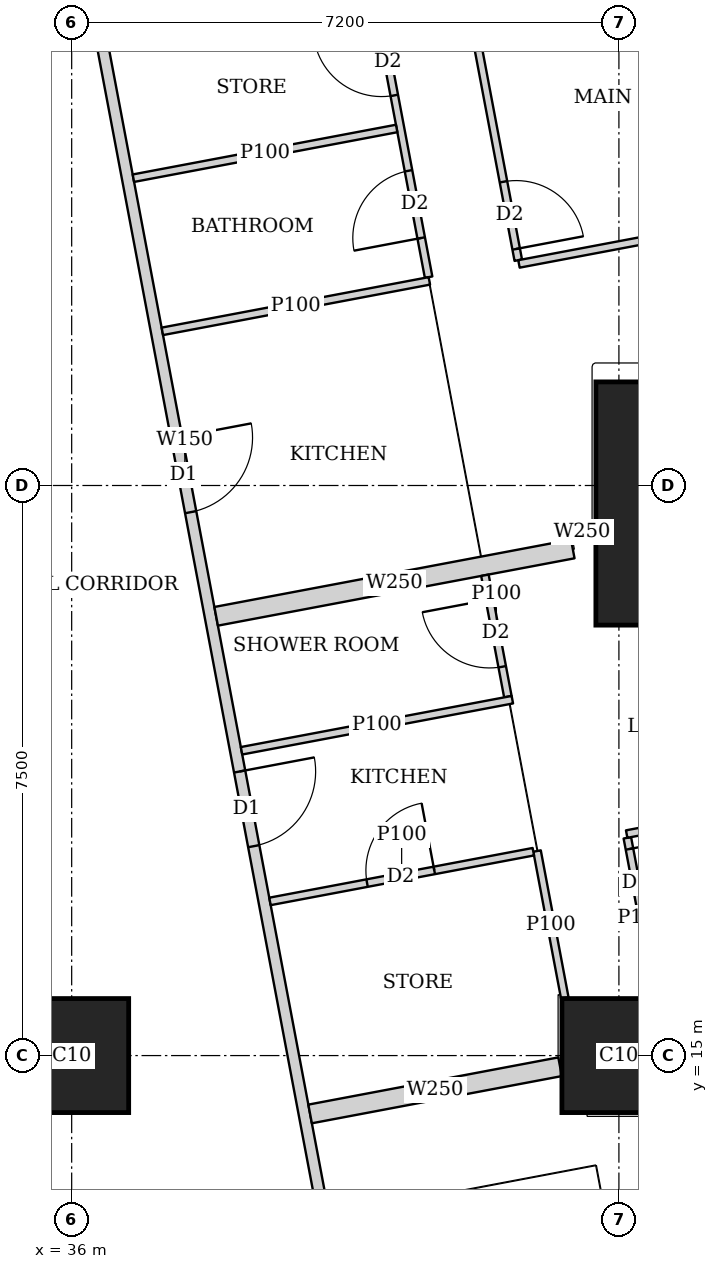
"""IFC4 building model, lengths in metres.
Left out: names, types, materials, properties, quantities, classifications, styles, units other than length and angle.
Written with IfcOpenShell. Run it as: python <this file> out.ifc"""

import sys

from ifc_helpers import new_model, si_unit, direction, frame, frame_2d, origin, origin_2d, place, context, subcontext, project, spatial, rectangle, extrude, element, fill, save


model = new_model("IFC4")
c1 = context("Model", 3, precision=1e-05, world=origin(), true_north=direction((0.0, 1.0)))
c2 = subcontext(c1, "Body", "Model", "MODEL_VIEW")
j1 = project(units=[si_unit("LENGTHUNIT", "METRE"), si_unit("PLANEANGLEUNIT", "RADIAN")], contexts=[c1])
p1 = place(None, origin())
s1 = spatial("IfcSite", under=j1, at=p1, CompositionType="ELEMENT")
p2 = place(p1, origin())
s2 = spatial("IfcBuilding", under=s1, at=p2, CompositionType="ELEMENT")
p3 = place(p2, frame((0.0, 0.0, 135.8)))
s3 = spatial("IfcBuildingStorey", under=s2, at=p3, CompositionType="ELEMENT", Elevation=135.8)
for number, where, z_axis, x_axis in (
    (1, (36.0, 15.0, 0.0), (0.0, 0.0, 1.0), (1.0, 0.0, 0.0)),
    (2, (43.2, 15.0, 0.0), (0.0, 0.0, 1.0), (1.0, 0.0, 0.0)),
):
    element("IfcColumn", number, at=place(p3, frame(where, z_axis=z_axis, x_axis=x_axis)), inside=s3, PredefinedType="COLUMN", context=c2, shape_type="SweptSolid", body=[
        extrude(rectangle(XDim=1.5, YDim=1.5, at=origin_2d()), origin(), (0.0, 0.0, 1.0), 3.75),
    ])
p4 = place(p3, frame((44.697, 22.263, 0.0), z_axis=(0.0, 0.0, 1.0), x_axis=(1.0, 0.0, 0.0)))
e3 = element("IfcColumn", 3, at=p4, inside=s3, PredefinedType="COLUMN", context=c2, shape_type="SweptSolid", body=[
    extrude(rectangle(XDim=3.6, YDim=3.2, at=origin_2d()), origin(), (0.0, 0.0, 1.0), 3.75),
])
p5 = place(p3, frame((50.653, 2.703, 0.0), z_axis=(0.0, 0.0, 1.0), x_axis=(-0.185612026696, 0.982623109613, 0.0)))
e4 = element("IfcWall", 4, at=p5, inside=s3, PredefinedType="SOLIDWALL", context=c2, shape_type="SweptSolid", body=[
    extrude(rectangle(XDim=41.393, YDim=0.2, at=frame_2d((20.697, 0.0))), origin(), (0.0, 0.0, 1.0), 3.5),
])
p6 = place(p5, frame((1.633, 0.0, 0.9)))
e5 = element("IfcOpeningElement", 5, at=p6, cuts=e4, PredefinedType="OPENING", context=c2, shape_type="SweptSolid", body=[
    extrude(rectangle(XDim=1.8, YDim=1.5, at=frame_2d((0.9, 0.75))), frame((0.0, 0.11, 0.0), z_axis=(0.0, -1.0, 0.0), x_axis=(1.0, 0.0, 0.0)), (0.0, 0.0, 1.0), 0.22),
])
p7 = place(p5, frame((6.032, 0.0, 0.9)))
e6 = element("IfcOpeningElement", 6, at=p7, cuts=e4, PredefinedType="OPENING", context=c2, shape_type="SweptSolid", body=[
    extrude(rectangle(XDim=1.8, YDim=1.5, at=frame_2d((0.9, 0.75))), frame((0.0, 0.11, 0.0), z_axis=(0.0, -1.0, 0.0), x_axis=(1.0, 0.0, 0.0)), (0.0, 0.0, 1.0), 0.22),
])
p8 = place(p5, frame((9.848, 0.0, 0.9)))
e7 = element("IfcOpeningElement", 7, at=p8, cuts=e4, PredefinedType="OPENING", context=c2, shape_type="SweptSolid", body=[
    extrude(rectangle(XDim=1.8, YDim=1.5, at=frame_2d((0.9, 0.75))), frame((0.0, 0.11, 0.0), z_axis=(0.0, -1.0, 0.0), x_axis=(1.0, 0.0, 0.0)), (0.0, 0.0, 1.0), 0.22),
])
p9 = place(p5, frame((13.664, 0.0, 0.9)))
e8 = element("IfcOpeningElement", 8, at=p9, cuts=e4, PredefinedType="OPENING", context=c2, shape_type="SweptSolid", body=[
    extrude(rectangle(XDim=1.8, YDim=1.5, at=frame_2d((0.9, 0.75))), frame((0.0, 0.11, 0.0), z_axis=(0.0, -1.0, 0.0), x_axis=(1.0, 0.0, 0.0)), (0.0, 0.0, 1.0), 0.22),
])
p10 = place(p5, frame((17.481, 0.0, 0.9)))
e9 = element("IfcOpeningElement", 9, at=p10, cuts=e4, PredefinedType="OPENING", context=c2, shape_type="SweptSolid", body=[
    extrude(rectangle(XDim=1.8, YDim=1.5, at=frame_2d((0.9, 0.75))), frame((0.0, 0.11, 0.0), z_axis=(0.0, -1.0, 0.0), x_axis=(1.0, 0.0, 0.0)), (0.0, 0.0, 1.0), 0.22),
])
p11 = place(p5, frame((21.297, 0.0, 0.9)))
e10 = element("IfcOpeningElement", 10, at=p11, cuts=e4, PredefinedType="OPENING", context=c2, shape_type="SweptSolid", body=[
    extrude(rectangle(XDim=1.8, YDim=1.5, at=frame_2d((0.9, 0.75))), frame((0.0, 0.11, 0.0), z_axis=(0.0, -1.0, 0.0), x_axis=(1.0, 0.0, 0.0)), (0.0, 0.0, 1.0), 0.22),
])
p12 = place(p5, frame((25.113, 0.0, 0.9)))
e11 = element("IfcOpeningElement", 11, at=p12, cuts=e4, PredefinedType="OPENING", context=c2, shape_type="SweptSolid", body=[
    extrude(rectangle(XDim=1.8, YDim=1.5, at=frame_2d((0.9, 0.75))), frame((0.0, 0.11, 0.0), z_axis=(0.0, -1.0, 0.0), x_axis=(1.0, 0.0, 0.0)), (0.0, 0.0, 1.0), 0.22),
])
p13 = place(p5, frame((28.93, 0.0, 0.9)))
e12 = element("IfcOpeningElement", 12, at=p13, cuts=e4, PredefinedType="OPENING", context=c2, shape_type="SweptSolid", body=[
    extrude(rectangle(XDim=1.8, YDim=1.5, at=frame_2d((0.9, 0.75))), frame((0.0, 0.11, 0.0), z_axis=(0.0, -1.0, 0.0), x_axis=(1.0, 0.0, 0.0)), (0.0, 0.0, 1.0), 0.22),
])
p14 = place(p5, frame((32.746, 0.0, 0.9)))
e13 = element("IfcOpeningElement", 13, at=p14, cuts=e4, PredefinedType="OPENING", context=c2, shape_type="SweptSolid", body=[
    extrude(rectangle(XDim=1.8, YDim=1.5, at=frame_2d((0.9, 0.75))), frame((0.0, 0.11, 0.0), z_axis=(0.0, -1.0, 0.0), x_axis=(1.0, 0.0, 0.0)), (0.0, 0.0, 1.0), 0.22),
])
p15 = place(p5, frame((36.481, 0.0, 0.9)))
e14 = element("IfcOpeningElement", 14, at=p15, cuts=e4, PredefinedType="OPENING", context=c2, shape_type="SweptSolid", body=[
    extrude(rectangle(XDim=1.8, YDim=1.5, at=frame_2d((0.9, 0.75))), frame((0.0, 0.11, 0.0), z_axis=(0.0, -1.0, 0.0), x_axis=(1.0, 0.0, 0.0)), (0.0, 0.0, 1.0), 0.22),
])
p16 = place(p3, frame((33.623, 43.022, 0.0), z_axis=(0.0, 0.0, 1.0), x_axis=(0.185596841028, -0.98262597798, 0.0)))
e15 = element("IfcWall", 15, at=p16, inside=s3, PredefinedType="SOLIDWALL", context=c2, shape_type="SweptSolid", body=[
    extrude(rectangle(XDim=41.66, YDim=0.15, at=frame_2d((20.83, 0.0))), origin(), (0.0, 0.0, 1.0), 2.5),
])
p17 = place(p16, frame((20.242, 0.0, 0.0)))
e16 = element("IfcOpeningElement", 16, at=p17, cuts=e15, PredefinedType="OPENING", context=c2, shape_type="SweptSolid", body=[
    extrude(rectangle(XDim=1.0, YDim=2.1, at=frame_2d((0.5, 1.05))), frame((0.0, 0.085, 0.0), z_axis=(0.0, -1.0, 0.0), x_axis=(1.0, 0.0, 0.0)), (0.0, 0.0, 1.0), 0.17),
])
p18 = place(p16, frame((24.714, 0.0, 0.0)))
e17 = element("IfcOpeningElement", 17, at=p18, cuts=e15, PredefinedType="OPENING", context=c2, shape_type="SweptSolid", body=[
    extrude(rectangle(XDim=1.0, YDim=2.1, at=frame_2d((0.5, 1.05))), frame((0.0, 0.085, 0.0), z_axis=(0.0, -1.0, 0.0), x_axis=(1.0, 0.0, 0.0)), (0.0, 0.0, 1.0), 0.17),
])
p19 = place(p16, frame((31.206, 0.0, 0.0)))
e18 = element("IfcOpeningElement", 18, at=p19, cuts=e15, PredefinedType="OPENING", context=c2, shape_type="SweptSolid", body=[
    extrude(rectangle(XDim=1.0, YDim=2.1, at=frame_2d((0.5, 1.05))), frame((0.0, 0.085, 0.0), z_axis=(0.0, -1.0, 0.0), x_axis=(1.0, 0.0, 0.0)), (0.0, 0.0, 1.0), 0.17),
])
p20 = place(p3, frame((38.701, 42.27, 0.0), z_axis=(0.0, 0.0, 1.0), x_axis=(0.185640619081, -0.98261770824, 0.0)))
e19 = element("IfcWall", 19, at=p20, inside=s3, PredefinedType="PARTITIONING", context=c2, shape_type="SweptSolid", body=[
    extrude(rectangle(XDim=17.103, YDim=0.1, at=frame_2d((8.552, 0.0))), origin(), (0.0, 0.0, 1.0), 2.5),
])
p21 = place(p20, frame((16.053, 0.0, 0.0)))
e20 = element("IfcOpeningElement", 20, at=p21, cuts=e19, PredefinedType="OPENING", context=c2, shape_type="SweptSolid", body=[
    extrude(rectangle(XDim=0.9, YDim=2.1, at=frame_2d((0.45, 1.05))), frame((0.0, 0.06, 0.0), z_axis=(0.0, -1.0, 0.0), x_axis=(1.0, 0.0, 0.0)), (0.0, 0.0, 1.0), 0.12),
])
p22 = place(p20, frame((12.077, 0.0, 0.0)))
e21 = element("IfcOpeningElement", 21, at=p22, cuts=e19, PredefinedType="OPENING", context=c2, shape_type="SweptSolid", body=[
    extrude(rectangle(XDim=0.9, YDim=2.1, at=frame_2d((0.45, 1.05))), frame((0.0, 0.06, 0.0), z_axis=(0.0, -1.0, 0.0), x_axis=(1.0, 0.0, 0.0)), (0.0, 0.0, 1.0), 0.12),
])
p23 = place(p20, frame((8.42, 0.0, 0.0)))
e22 = element("IfcOpeningElement", 22, at=p23, cuts=e19, PredefinedType="OPENING", context=c2, shape_type="SweptSolid", body=[
    extrude(rectangle(XDim=0.9, YDim=2.1, at=frame_2d((0.45, 1.05))), frame((0.0, 0.06, 0.0), z_axis=(0.0, -1.0, 0.0), x_axis=(1.0, 0.0, 0.0)), (0.0, 0.0, 1.0), 0.12),
])
p24 = place(p20, frame((4.444, 0.0, 0.0)))
e23 = element("IfcOpeningElement", 23, at=p24, cuts=e19, PredefinedType="OPENING", context=c2, shape_type="SweptSolid", body=[
    extrude(rectangle(XDim=0.9, YDim=2.1, at=frame_2d((0.45, 1.05))), frame((0.0, 0.06, 0.0), z_axis=(0.0, -1.0, 0.0), x_axis=(1.0, 0.0, 0.0)), (0.0, 0.0, 1.0), 0.12),
])
p25 = place(p3, frame((37.411, 42.638, 0.0), z_axis=(0.0, 0.0, 1.0), x_axis=(0.185555586706, -0.982633769134, 0.0)))
e24 = element("IfcWall", 24, at=p25, inside=s3, PredefinedType="PARTITIONING", context=c2, shape_type="SweptSolid", body=[
    extrude(rectangle(XDim=17.704, YDim=0.1, at=frame_2d((8.852, 0.0))), origin(), (0.0, 0.0, 1.0), 2.5),
])
p26 = place(p25, frame((16.28, 0.0, 0.0)))
e25 = element("IfcOpeningElement", 25, at=p26, cuts=e24, PredefinedType="OPENING", context=c2, shape_type="SweptSolid", body=[
    extrude(rectangle(XDim=0.9, YDim=2.1, at=frame_2d((0.45, 1.05))), frame((0.0, 0.06, 0.0), z_axis=(0.0, -1.0, 0.0), x_axis=(1.0, 0.0, 0.0)), (0.0, 0.0, 1.0), 0.12),
])
p27 = place(p25, frame((12.688, 0.0, 0.0)))
e26 = element("IfcOpeningElement", 26, at=p27, cuts=e24, PredefinedType="OPENING", context=c2, shape_type="SweptSolid", body=[
    extrude(rectangle(XDim=0.9, YDim=2.1, at=frame_2d((0.45, 1.05))), frame((0.0, 0.06, 0.0), z_axis=(0.0, -1.0, 0.0), x_axis=(1.0, 0.0, 0.0)), (0.0, 0.0, 1.0), 0.12),
])
p28 = place(p25, frame((8.822, 0.0, 0.0)))
e27 = element("IfcOpeningElement", 27, at=p28, cuts=e24, PredefinedType="OPENING", context=c2, shape_type="SweptSolid", body=[
    extrude(rectangle(XDim=0.9, YDim=2.1, at=frame_2d((0.45, 1.05))), frame((0.0, 0.06, 0.0), z_axis=(0.0, -1.0, 0.0), x_axis=(1.0, 0.0, 0.0)), (0.0, 0.0, 1.0), 0.12),
])
p29 = place(p25, frame((3.188, 0.0, 0.0)))
e28 = element("IfcOpeningElement", 28, at=p29, cuts=e24, PredefinedType="OPENING", context=c2, shape_type="SweptSolid", body=[
    extrude(rectangle(XDim=0.9, YDim=2.1, at=frame_2d((0.45, 1.05))), frame((0.0, 0.06, 0.0), z_axis=(0.0, -1.0, 0.0), x_axis=(1.0, 0.0, 0.0)), (0.0, 0.0, 1.0), 0.12),
])
p30 = place(p25, frame((0.15, 0.0, 0.0)))
e29 = element("IfcOpeningElement", 29, at=p30, cuts=e24, PredefinedType="OPENING", context=c2, shape_type="SweptSolid", body=[
    extrude(rectangle(XDim=0.9, YDim=2.1, at=frame_2d((0.45, 1.05))), frame((0.0, 0.06, 0.0), z_axis=(0.0, -1.0, 0.0), x_axis=(1.0, 0.0, 0.0)), (0.0, 0.0, 1.0), 0.12),
])
p31 = place(p25, frame((14.371, 0.0, 0.0)))
e30 = element("IfcOpeningElement", 30, at=p31, cuts=e24, PredefinedType="OPENING", context=c2, shape_type="SweptSolid", body=[
    extrude(rectangle(XDim=0.9, YDim=2.1, at=frame_2d((0.45, 1.05))), frame((0.0, 0.06, 0.0), z_axis=(0.0, -1.0, 0.0), x_axis=(1.0, 0.0, 0.0)), (0.0, 0.0, 1.0), 0.12),
])
p32 = place(p25, frame((10.78, 0.0, 0.0)))
e31 = element("IfcOpeningElement", 31, at=p32, cuts=e24, PredefinedType="OPENING", context=c2, shape_type="SweptSolid", body=[
    extrude(rectangle(XDim=0.9, YDim=2.1, at=frame_2d((0.45, 1.05))), frame((0.0, 0.06, 0.0), z_axis=(0.0, -1.0, 0.0), x_axis=(1.0, 0.0, 0.0)), (0.0, 0.0, 1.0), 0.12),
])
p33 = place(p25, frame((6.154, 0.0, 0.0)))
e32 = element("IfcOpeningElement", 32, at=p33, cuts=e24, PredefinedType="OPENING", context=c2, shape_type="SweptSolid", body=[
    extrude(rectangle(XDim=0.9, YDim=2.1, at=frame_2d((0.45, 1.05))), frame((0.0, 0.06, 0.0), z_axis=(0.0, -1.0, 0.0), x_axis=(1.0, 0.0, 0.0)), (0.0, 0.0, 1.0), 0.12),
])
p34 = place(p3, frame((46.11, 26.213, 0.0), z_axis=(0.0, 0.0, 1.0), x_axis=(-0.982633535512, -0.185556823879, 0.0)))
e33 = element("IfcWall", 33, at=p34, inside=s3, PredefinedType="PARTITIONING", context=c2, shape_type="SweptSolid", body=[
    extrude(rectangle(XDim=4.3, YDim=0.1, at=frame_2d((2.15, 0.0))), origin(), (0.0, 0.0, 1.0), 2.1),
])
p35 = place(p3, frame((40.706, 25.192, 0.0), z_axis=(0.0, 0.0, 1.0), x_axis=(-0.982610675728, -0.185677839134, 0.0)))
e34 = element("IfcWall", 34, at=p35, inside=s3, PredefinedType="PARTITIONING", context=c2, shape_type="SweptSolid", body=[
    extrude(rectangle(XDim=3.575, YDim=0.1, at=frame_2d((1.788, 0.0))), origin(), (0.0, 0.0, 1.0), 3.5),
])
p36 = place(p3, frame((40.276, 27.197, 0.0), z_axis=(0.0, 0.0, 1.0), x_axis=(-0.982636169624, -0.185542874149, 0.0)))
e35 = element("IfcWall", 35, at=p36, inside=s3, PredefinedType="PARTITIONING", context=c2, shape_type="SweptSolid", body=[
    extrude(rectangle(XDim=3.525, YDim=0.1, at=frame_2d((1.763, 0.0))), origin(), (0.0, 0.0, 1.0), 3.5),
])
p37 = place(p3, frame((41.437, 21.319, 0.0), z_axis=(0.0, 0.0, 1.0), x_axis=(0.185793689589, -0.982588777113, 0.0)))
e36 = element("IfcWall", 36, at=p37, inside=s3, PredefinedType="PARTITIONING", context=c2, shape_type="SweptSolid", body=[
    extrude(rectangle(XDim=1.625, YDim=0.1, at=frame_2d((0.813, 0.0))), origin(), (0.0, 0.0, 1.0), 3.5),
])
p38 = place(p37, frame((0.325, 0.0, 0.0)))
e37 = element("IfcOpeningElement", 37, at=p38, cuts=e36, PredefinedType="OPENING", context=c2, shape_type="SweptSolid", body=[
    extrude(rectangle(XDim=0.9, YDim=2.1, at=frame_2d((0.45, 1.05))), frame((0.0, 0.06, 0.0), z_axis=(0.0, -1.0, 0.0), x_axis=(1.0, 0.0, 0.0)), (0.0, 0.0, 1.0), 0.12),
])
p39 = place(p3, frame((41.798, 19.682, 0.0), z_axis=(0.0, 0.0, 1.0), x_axis=(-0.982681091817, -0.185304807776, 0.0)))
e38 = element("IfcWall", 38, at=p39, inside=s3, PredefinedType="PARTITIONING", context=c2, shape_type="SweptSolid", body=[
    extrude(rectangle(XDim=3.626, YDim=0.1, at=frame_2d((1.813, 0.0))), origin(), (0.0, 0.0, 1.0), 3.5),
])
p40 = place(p3, frame((43.311, 17.865, 0.0), z_axis=(0.0, 0.0, 1.0), x_axis=(0.185760825203, -0.982594990736, 0.0)))
e39 = element("IfcWall", 39, at=p40, inside=s3, PredefinedType="PARTITIONING", context=c2, shape_type="SweptSolid", body=[
    extrude(rectangle(XDim=2.142, YDim=0.1, at=frame_2d((1.071, 0.0))), origin(), (0.0, 0.0, 1.0), 3.5),
])
p41 = place(p40, frame((0.15, 0.0, 0.0)))
e40 = element("IfcOpeningElement", 40, at=p41, cuts=e39, PredefinedType="OPENING", context=c2, shape_type="SweptSolid", body=[
    extrude(rectangle(XDim=0.9, YDim=2.1, at=frame_2d((0.45, 1.05))), frame((0.0, 0.06, 0.0), z_axis=(0.0, -1.0, 0.0), x_axis=(1.0, 0.0, 0.0)), (0.0, 0.0, 1.0), 0.12),
])
p42 = place(p3, frame((42.123, 17.691, 0.0), z_axis=(0.0, 0.0, 1.0), x_axis=(0.185554843339, -0.982633909507, 0.0)))
e41 = element("IfcWall", 41, at=p42, inside=s3, PredefinedType="PARTITIONING", context=c2, shape_type="SweptSolid", body=[
    extrude(rectangle(XDim=1.967, YDim=0.1, at=frame_2d((0.983, 0.0))), origin(), (0.0, 0.0, 1.0), 3.5),
])
p43 = place(p3, frame((47.527, 18.712, 0.0), z_axis=(0.0, 0.0, 1.0), x_axis=(-0.982633535512, -0.185556823879, 0.0)))
e42 = element("IfcWall", 42, at=p43, inside=s3, PredefinedType="PARTITIONING", context=c2, shape_type="SweptSolid", body=[
    extrude(rectangle(XDim=4.3, YDim=0.1, at=frame_2d((2.15, 0.0))), origin(), (0.0, 0.0, 1.0), 2.1),
])
p44 = place(p3, frame((42.074, 17.682, 0.0), z_axis=(0.0, 0.0, 1.0), x_axis=(-0.982660701716, -0.185412904897, 0.0)))
e43 = element("IfcWall", 43, at=p44, inside=s3, PredefinedType="PARTITIONING", context=c2, shape_type="SweptSolid", body=[
    extrude(rectangle(XDim=3.526, YDim=0.1, at=frame_2d((1.763, 0.0))), origin(), (0.0, 0.0, 1.0), 3.5),
])
p45 = place(p44, frame((1.326, 0.0, 0.0)))
e44 = element("IfcOpeningElement", 44, at=p45, cuts=e43, PredefinedType="OPENING", context=c2, shape_type="SweptSolid", body=[
    extrude(rectangle(XDim=0.9, YDim=2.1, at=frame_2d((0.45, 1.05))), frame((0.0, 0.06, 0.0), z_axis=(0.0, -1.0, 0.0), x_axis=(1.0, 0.0, 0.0)), (0.0, 0.0, 1.0), 0.12),
])
p46 = place(p3, frame((42.873, 21.918, 0.0), z_axis=(0.0, 0.0, 1.0), x_axis=(-0.982431406936, -0.186624035603, 0.0)))
e45 = element("IfcWall", 45, at=p46, inside=s3, PredefinedType="SOLIDWALL", context=c2, shape_type="SweptSolid", body=[
    extrude(rectangle(XDim=0.322, YDim=0.25, at=frame_2d((0.161, 0.0))), origin(), (0.0, 0.0, 1.0), 2.5),
])
p47 = place(p3, frame((42.593, 21.665, 0.0), z_axis=(0.0, 0.0, 1.0), x_axis=(-0.982635807605, -0.185544791394, 0.0)))
e46 = element("IfcWall", 46, at=p47, inside=s3, PredefinedType="SOLIDWALL", context=c2, shape_type="SweptSolid", body=[
    extrude(rectangle(XDim=4.775, YDim=0.25, at=frame_2d((2.388, 0.0))), origin(), (0.0, 0.0, 1.0), 2.5),
])
p48 = place(p3, frame((42.426, 14.853, 0.0), z_axis=(0.0, 0.0, 1.0), x_axis=(-0.982633560103, -0.185556693654, 0.0)))
e47 = element("IfcWall", 47, at=p48, inside=s3, PredefinedType="SOLIDWALL", context=c2, shape_type="SweptSolid", body=[
    extrude(rectangle(XDim=3.347, YDim=0.25, at=frame_2d((1.674, 0.0))), origin(), (0.0, 0.0, 1.0), 3.5),
])
p49 = place(p21, origin())
e48 = element("IfcDoor", 48, at=p49, inside=s3, OperationType="SINGLE_SWING_RIGHT", PredefinedType="DOOR", context=c2, shape_type="SweptSolid", body=[
    extrude(rectangle(XDim=0.9, YDim=2.1, at=frame_2d((0.45, 1.05))), frame((0.0, 0.025, 0.0), z_axis=(0.0, -1.0, 0.0), x_axis=(1.0, 0.0, 0.0)), (0.0, 0.0, 1.0), 0.05),
])
fill(e20, e48)
p50 = place(p26, origin())
e49 = element("IfcDoor", 49, at=p50, inside=s3, OperationType="SINGLE_SWING_LEFT", PredefinedType="DOOR", context=c2, shape_type="SweptSolid", body=[
    extrude(rectangle(XDim=0.9, YDim=2.1, at=frame_2d((0.45, 1.05))), frame((0.0, 0.025, 0.0), z_axis=(0.0, -1.0, 0.0), x_axis=(1.0, 0.0, 0.0)), (0.0, 0.0, 1.0), 0.05),
])
fill(e25, e49)
p51 = place(p31, origin())
e50 = element("IfcDoor", 50, at=p51, inside=s3, OperationType="SINGLE_SWING_RIGHT", PredefinedType="DOOR", context=c2, shape_type="SweptSolid", body=[
    extrude(rectangle(XDim=0.9, YDim=2.1, at=frame_2d((0.45, 1.05))), frame((0.0, 0.025, 0.0), z_axis=(0.0, -1.0, 0.0), x_axis=(1.0, 0.0, 0.0)), (0.0, 0.0, 1.0), 0.05),
])
fill(e30, e50)
p52 = place(p17, origin())
e51 = element("IfcDoor", 51, at=p52, inside=s3, OperationType="SINGLE_SWING_LEFT", PredefinedType="DOOR", context=c2, shape_type="SweptSolid", body=[
    extrude(rectangle(XDim=1.0, YDim=2.1, at=frame_2d((0.5, 1.05))), frame((0.0, 0.025, 0.0), z_axis=(0.0, -1.0, 0.0), x_axis=(1.0, 0.0, 0.0)), (0.0, 0.0, 1.0), 0.05),
])
fill(e16, e51)
p53 = place(p38, origin())
e52 = element("IfcDoor", 52, at=p53, inside=s3, OperationType="SINGLE_SWING_RIGHT", PredefinedType="DOOR", context=c2, shape_type="SweptSolid", body=[
    extrude(rectangle(XDim=0.9, YDim=2.1, at=frame_2d((0.45, 1.05))), frame((0.0, 0.025, 0.0), z_axis=(0.0, -1.0, 0.0), x_axis=(1.0, 0.0, 0.0)), (0.0, 0.0, 1.0), 0.05),
])
fill(e37, e52)
p54 = place(p41, origin())
e53 = element("IfcDoor", 53, at=p54, inside=s3, OperationType="SINGLE_SWING_LEFT", PredefinedType="DOOR", context=c2, shape_type="SweptSolid", body=[
    extrude(rectangle(XDim=0.9, YDim=2.1, at=frame_2d((0.45, 1.05))), frame((0.0, 0.025, 0.0), z_axis=(0.0, -1.0, 0.0), x_axis=(1.0, 0.0, 0.0)), (0.0, 0.0, 1.0), 0.05),
])
fill(e40, e53)
p55 = place(p18, origin())
e54 = element("IfcDoor", 54, at=p55, inside=s3, OperationType="SINGLE_SWING_LEFT", PredefinedType="DOOR", context=c2, shape_type="SweptSolid", body=[
    extrude(rectangle(XDim=1.0, YDim=2.1, at=frame_2d((0.5, 1.05))), frame((0.0, 0.025, 0.0), z_axis=(0.0, -1.0, 0.0), x_axis=(1.0, 0.0, 0.0)), (0.0, 0.0, 1.0), 0.05),
])
fill(e17, e54)
p56 = place(p45, origin())
e55 = element("IfcDoor", 55, at=p56, inside=s3, OperationType="SINGLE_SWING_RIGHT", PredefinedType="DOOR", context=c2, shape_type="SweptSolid", body=[
    extrude(rectangle(XDim=0.9, YDim=2.1, at=frame_2d((0.45, 1.05))), frame((0.0, 0.025, 0.0), z_axis=(0.0, -1.0, 0.0), x_axis=(1.0, 0.0, 0.0)), (0.0, 0.0, 1.0), 0.05),
])
fill(e44, e55)
save(model, sys.argv[1])
